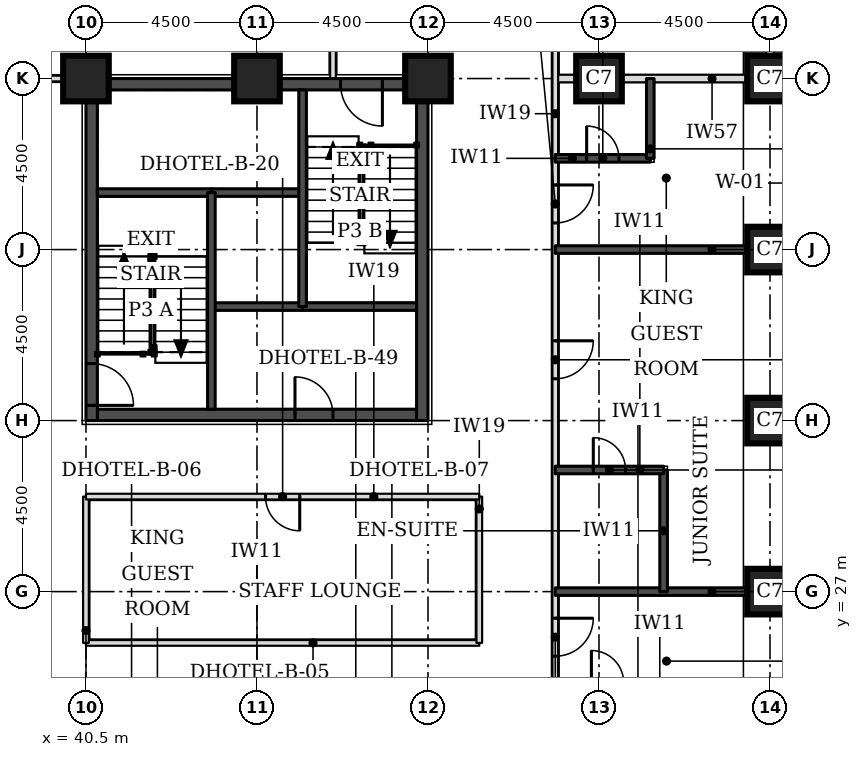
"""IFC4 building model, lengths in metres.
Left out: names, types, materials, properties, quantities, classifications, styles, units other than length and angle.
Written with IfcOpenShell. Run it as: python <this file> out.ifc"""

import sys

from ifc_helpers import new_model, si_unit, direction, frame, frame_2d, origin, origin_2d, place, context, subcontext, project, spatial, rectangle, extrude, element, fill, save


model = new_model("IFC4")
c1 = context("Model", 3, precision=1e-05, world=origin(), true_north=direction((0.0, 1.0)))
c2 = subcontext(c1, "Body", "Model", "MODEL_VIEW")
j1 = project(units=[si_unit("LENGTHUNIT", "METRE"), si_unit("PLANEANGLEUNIT", "RADIAN")], contexts=[c1])
p1 = place(None, origin())
s1 = spatial("IfcSite", under=j1, at=p1, CompositionType="ELEMENT")
p2 = place(p1, origin())
s2 = spatial("IfcBuilding", under=s1, at=p2, CompositionType="ELEMENT")
p3 = place(p2, frame((0.0, 0.0, 29.7)))
s3 = spatial("IfcBuildingStorey", under=s2, at=p3, CompositionType="ELEMENT", Elevation=29.7)
for number, where, z_axis, x_axis in (
    (1, (58.5, 27.0, 0.0), (0.0, 0.0, 1.0), (1.0, 0.0, 0.0)),
    (2, (58.5, 31.5, 0.0), (0.0, 0.0, 1.0), (1.0, 0.0, 0.0)),
    (3, (58.5, 36.0, 0.0), (0.0, 0.0, 1.0), (1.0, 0.0, 0.0)),
    (4, (40.5, 40.5, 0.0), (0.0, 0.0, 1.0), (1.0, 0.0, 0.0)),
    (5, (45.0, 40.5, 0.0), (0.0, 0.0, 1.0), (1.0, 0.0, 0.0)),
    (6, (49.5, 40.5, 0.0), (0.0, 0.0, 1.0), (1.0, 0.0, 0.0)),
    (7, (54.0, 40.5, 0.0), (0.0, 0.0, 1.0), (1.0, 0.0, 0.0)),
    (8, (58.5, 40.5, 0.0), (0.0, 0.0, 1.0), (1.0, 0.0, 0.0)),
):
    element("IfcColumn", number, at=place(p3, frame(where, z_axis=z_axis, x_axis=x_axis)), inside=s3, PredefinedType="COLUMN", context=c2, shape_type="SweptSolid", body=[
        extrude(rectangle(XDim=1.2, YDim=1.2, at=origin_2d()), origin(), (0.0, 0.0, 1.0), 3.3),
    ])
p4 = place(p3, frame((40.8, 31.65, 0.0), z_axis=(0.0, 0.0, 1.0), x_axis=(1.0, 0.0, 0.0)))
e9 = element("IfcWall", 9, at=p4, inside=s3, PredefinedType="SHEAR", context=c2, shape_type="SweptSolid", body=[
    extrude(rectangle(XDim=8.4, YDim=0.3, at=frame_2d((4.2, 0.0))), origin(), (0.0, 0.0, 1.0), 3.3),
])
p5 = place(p4, frame((5.2, 0.0, 0.0)))
e10 = element("IfcOpeningElement", 10, at=p5, cuts=e9, PredefinedType="OPENING", context=c2, shape_type="SweptSolid", body=[
    extrude(rectangle(XDim=1.0, YDim=2.1, at=frame_2d((0.5, 1.05))), frame((0.0, 0.16, 0.0), z_axis=(0.0, -1.0, 0.0), x_axis=(1.0, 0.0, 0.0)), (0.0, 0.0, 1.0), 0.32),
])
p6 = place(p3, frame((40.8, 40.35, 0.0), z_axis=(0.0, 0.0, 1.0), x_axis=(1.0, 0.0, 0.0)))
e11 = element("IfcWall", 11, at=p6, inside=s3, PredefinedType="SHEAR", context=c2, shape_type="SweptSolid", body=[
    extrude(rectangle(XDim=8.4, YDim=0.3, at=frame_2d((4.2, 0.0))), origin(), (0.0, 0.0, 1.0), 3.3),
])
p7 = place(p6, frame((6.4, 0.0, 0.0)))
e12 = element("IfcOpeningElement", 12, at=p7, cuts=e11, PredefinedType="OPENING", context=c2, shape_type="SweptSolid", body=[
    extrude(rectangle(XDim=1.1, YDim=2.1, at=frame_2d((0.55, 1.05))), frame((0.0, 0.16, 0.0), z_axis=(0.0, -1.0, 0.0), x_axis=(1.0, 0.0, 0.0)), (0.0, 0.0, 1.0), 0.32),
])
p8 = place(p3, frame((40.65, 31.5, 0.0), z_axis=(0.0, 0.0, 1.0), x_axis=(0.0, 1.0, 0.0)))
e13 = element("IfcWall", 13, at=p8, inside=s3, PredefinedType="SHEAR", context=c2, shape_type="SweptSolid", body=[
    extrude(rectangle(XDim=9.0, YDim=0.3, at=frame_2d((4.5, 0.0))), origin(), (0.0, 0.0, 1.0), 3.3),
])
p9 = place(p8, frame((0.4, 0.0, 0.0)))
e14 = element("IfcOpeningElement", 14, at=p9, cuts=e13, PredefinedType="OPENING", context=c2, shape_type="SweptSolid", body=[
    extrude(rectangle(XDim=1.1, YDim=2.1, at=frame_2d((0.55, 1.05))), frame((0.0, 0.16, 0.0), z_axis=(0.0, -1.0, 0.0), x_axis=(1.0, 0.0, 0.0)), (0.0, 0.0, 1.0), 0.32),
])
p10 = place(p3, frame((49.35, 31.5, 0.0), z_axis=(0.0, 0.0, 1.0), x_axis=(0.0, 1.0, 0.0)))
e15 = element("IfcWall", 15, at=p10, inside=s3, PredefinedType="SHEAR", context=c2, shape_type="SweptSolid", body=[
    extrude(rectangle(XDim=9.0, YDim=0.3, at=frame_2d((4.5, 0.0))), origin(), (0.0, 0.0, 1.0), 3.3),
])
p11 = place(p3, frame((52.85, 40.5, 0.0), z_axis=(0.0, 0.0, 1.0), x_axis=(1.0, 0.0, 0.0)))
e16 = element("IfcWall", 16, at=p11, inside=s3, PredefinedType="PARTITIONING", context=c2, shape_type="SweptSolid", body=[
    extrude(rectangle(XDim=5.05, YDim=0.2, at=frame_2d((2.525, 0.0))), origin(), (0.0, 0.0, 1.0), 2.33),
])
p12 = place(p3, frame((58.5, 41.1, 0.0), z_axis=(0.0, 0.0, 1.0), x_axis=(0.0, 1.0, 0.0)))
e17 = element("IfcWall", 17, at=p12, inside=s3, PredefinedType="PARTITIONING", context=c2, shape_type="SweptSolid", body=[
    extrude(rectangle(XDim=6.4, YDim=0.2, at=frame_2d((3.2, 0.0))), origin(), (0.0, 0.0, 1.0), 3.08),
])
p13 = place(p3, frame((52.85, 23.65, 0.0), z_axis=(0.0, 0.0, 1.0), x_axis=(0.0, 1.0, 0.0)))
e18 = element("IfcWall", 18, at=p13, inside=s3, PredefinedType="PARTITIONING", context=c2, shape_type="SweptSolid", body=[
    extrude(rectangle(XDim=23.85, YDim=0.15, at=frame_2d((11.925, 0.0))), origin(), (0.0, 0.0, 1.0), 3.08),
])
p14 = place(p13, frame((1.65, 0.0, 0.0)))
e19 = element("IfcOpeningElement", 19, at=p14, cuts=e18, PredefinedType="OPENING", context=c2, shape_type="SweptSolid", body=[
    extrude(rectangle(XDim=1.0, YDim=2.1, at=frame_2d((0.5, 1.05))), frame((0.0, 0.085, 0.0), z_axis=(0.0, -1.0, 0.0), x_axis=(1.0, 0.0, 0.0)), (0.0, 0.0, 1.0), 0.17),
])
p15 = place(p13, frame((8.95, 0.0, 0.0)))
e20 = element("IfcOpeningElement", 20, at=p15, cuts=e18, PredefinedType="OPENING", context=c2, shape_type="SweptSolid", body=[
    extrude(rectangle(XDim=1.0, YDim=2.1, at=frame_2d((0.5, 1.05))), frame((0.0, 0.085, 0.0), z_axis=(0.0, -1.0, 0.0), x_axis=(1.0, 0.0, 0.0)), (0.0, 0.0, 1.0), 0.17),
])
p16 = place(p13, frame((13.05, 0.0, 0.0)))
e21 = element("IfcOpeningElement", 21, at=p16, cuts=e18, PredefinedType="OPENING", context=c2, shape_type="SweptSolid", body=[
    extrude(rectangle(XDim=1.0, YDim=2.1, at=frame_2d((0.5, 1.05))), frame((0.0, 0.085, 0.0), z_axis=(0.0, -1.0, 0.0), x_axis=(1.0, 0.0, 0.0)), (0.0, 0.0, 1.0), 0.17),
])
p17 = place(p13, frame((19.9, 0.0, 0.0)))
e22 = element("IfcOpeningElement", 22, at=p17, cuts=e18, PredefinedType="OPENING", context=c2, shape_type="SweptSolid", body=[
    extrude(rectangle(XDim=0.9, YDim=2.1, at=frame_2d((0.45, 1.05))), frame((0.0, 0.085, 0.0), z_axis=(0.0, -1.0, 0.0), x_axis=(1.0, 0.0, 0.0)), (0.0, 0.0, 1.0), 0.17),
])
p18 = place(p3, frame((40.5, 25.65, 0.0), z_axis=(0.0, 0.0, 1.0), x_axis=(1.0, 0.0, 0.0)))
e23 = element("IfcWall", 23, at=p18, inside=s3, PredefinedType="PARTITIONING", context=c2, shape_type="SweptSolid", body=[
    extrude(rectangle(XDim=10.35, YDim=0.15, at=frame_2d((5.175, 0.0))), origin(), (0.0, 0.0, 1.0), 3.08),
])
for number, where, z_axis, x_axis in (
    (24, (40.5, 25.65, 0.0), (0.0, 0.0, 1.0), (0.0, 1.0, 0.0)),
    (25, (50.85, 25.65, 0.0), (0.0, 0.0, 1.0), (0.0, 1.0, 0.0)),
):
    element("IfcWall", number, at=place(p3, frame(where, z_axis=z_axis, x_axis=x_axis)), inside=s3, PredefinedType="PARTITIONING", context=c2, shape_type="SweptSolid", body=[
        extrude(rectangle(XDim=3.85, YDim=0.15, at=frame_2d((1.925, 0.0))), origin(), (0.0, 0.0, 1.0), 3.08),
    ])
p19 = place(p3, frame((40.5, 29.5, 0.0), z_axis=(0.0, 0.0, 1.0), x_axis=(1.0, 0.0, 0.0)))
e26 = element("IfcWall", 26, at=p19, inside=s3, PredefinedType="PARTITIONING", context=c2, shape_type="SweptSolid", body=[
    extrude(rectangle(XDim=10.35, YDim=0.15, at=frame_2d((5.175, 0.0))), origin(), (0.0, 0.0, 1.0), 3.08),
])
p20 = place(p19, frame((4.725, 0.0, 0.0)))
e27 = element("IfcOpeningElement", 27, at=p20, cuts=e26, PredefinedType="OPENING", context=c2, shape_type="SweptSolid", body=[
    extrude(rectangle(XDim=0.9, YDim=2.1, at=frame_2d((0.45, 1.05))), frame((0.0, 0.085, 0.0), z_axis=(0.0, -1.0, 0.0), x_axis=(1.0, 0.0, 0.0)), (0.0, 0.0, 1.0), 0.17),
])
p21 = place(p3, frame((38.5, 40.5, 0.0), z_axis=(0.0, 0.0, 1.0), x_axis=(1.0, 0.0, 0.0)))
e28 = element("IfcWall", 28, at=p21, inside=s3, PredefinedType="PARTITIONING", context=c2, shape_type="SweptSolid", body=[
    extrude(rectangle(XDim=1.95, YDim=0.15, at=frame_2d((0.975, 0.0))), origin(), (0.0, 0.0, 1.0), 2.33),
])
p22 = place(p3, frame((47.0, 40.5, 0.0), z_axis=(0.0, 0.0, 1.0), x_axis=(0.0, 1.0, 0.0)))
e29 = element("IfcWall", 29, at=p22, inside=s3, PredefinedType="PARTITIONING", context=c2, shape_type="SweptSolid", body=[
    extrude(rectangle(XDim=7.0, YDim=0.15, at=frame_2d((3.5, 0.0))), origin(), (0.0, 0.0, 1.0), 3.08),
])
p23 = place(p22, frame((3.05, 0.0, 0.0)))
e30 = element("IfcOpeningElement", 30, at=p23, cuts=e29, PredefinedType="OPENING", context=c2, shape_type="SweptSolid", body=[
    extrude(rectangle(XDim=0.9, YDim=2.1, at=frame_2d((0.45, 1.05))), frame((0.0, 0.085, 0.0), z_axis=(0.0, -1.0, 0.0), x_axis=(1.0, 0.0, 0.0)), (0.0, 0.0, 1.0), 0.17),
])
p24 = place(p3, frame((52.85, 27.0, 0.0), z_axis=(0.0, 0.0, 1.0), x_axis=(1.0, 0.0, 0.0)))
e31 = element("IfcWall", 31, at=p24, inside=s3, PredefinedType="SOLIDWALL", context=c2, shape_type="SweptSolid", body=[
    extrude(rectangle(XDim=5.05, YDim=0.2, at=frame_2d((2.525, 0.0))), origin(), (0.0, 0.0, 1.0), 3.08),
])
p25 = place(p3, frame((55.7, 27.0, 0.0), z_axis=(0.0, 0.0, 1.0), x_axis=(0.0, 1.0, 0.0)))
e32 = element("IfcWall", 32, at=p25, inside=s3, PredefinedType="SOLIDWALL", context=c2, shape_type="SweptSolid", body=[
    extrude(rectangle(XDim=3.2, YDim=0.2, at=frame_2d((1.6, 0.0))), origin(), (0.0, 0.0, 1.0), 3.08),
])
p26 = place(p3, frame((52.85, 30.2, 0.0), z_axis=(0.0, 0.0, 1.0), x_axis=(1.0, 0.0, 0.0)))
e33 = element("IfcWall", 33, at=p26, inside=s3, PredefinedType="SOLIDWALL", context=c2, shape_type="SweptSolid", body=[
    extrude(rectangle(XDim=2.85, YDim=0.2, at=frame_2d((1.425, 0.0))), origin(), (0.0, 0.0, 1.0), 3.08),
])
p27 = place(p26, frame((1.0, 0.0, 0.0)))
e34 = element("IfcOpeningElement", 34, at=p27, cuts=e33, PredefinedType="OPENING", context=c2, shape_type="SweptSolid", body=[
    extrude(rectangle(XDim=0.85, YDim=2.1, at=frame_2d((0.425, 1.05))), frame((0.0, 0.11, 0.0), z_axis=(0.0, -1.0, 0.0), x_axis=(1.0, 0.0, 0.0)), (0.0, 0.0, 1.0), 0.22),
])
p28 = place(p3, frame((52.85, 36.0, 0.0), z_axis=(0.0, 0.0, 1.0), x_axis=(1.0, 0.0, 0.0)))
e35 = element("IfcWall", 35, at=p28, inside=s3, PredefinedType="SOLIDWALL", context=c2, shape_type="SweptSolid", body=[
    extrude(rectangle(XDim=5.05, YDim=0.2, at=frame_2d((2.525, 0.0))), origin(), (0.0, 0.0, 1.0), 3.08),
])
p29 = place(p3, frame((52.85, 38.4, 0.0), z_axis=(0.0, 0.0, 1.0), x_axis=(1.0, 0.0, 0.0)))
e36 = element("IfcWall", 36, at=p29, inside=s3, PredefinedType="SOLIDWALL", context=c2, shape_type="SweptSolid", body=[
    extrude(rectangle(XDim=2.5, YDim=0.2, at=frame_2d((1.25, 0.0))), origin(), (0.0, 0.0, 1.0), 3.08),
])
p30 = place(p29, frame((0.825, 0.0, 0.0)))
e37 = element("IfcOpeningElement", 37, at=p30, cuts=e36, PredefinedType="OPENING", context=c2, shape_type="SweptSolid", body=[
    extrude(rectangle(XDim=0.85, YDim=2.1, at=frame_2d((0.425, 1.05))), frame((0.0, 0.11, 0.0), z_axis=(0.0, -1.0, 0.0), x_axis=(1.0, 0.0, 0.0)), (0.0, 0.0, 1.0), 0.22),
])
p31 = place(p3, frame((55.35, 38.4, 0.0), z_axis=(0.0, 0.0, 1.0), x_axis=(0.0, 1.0, 0.0)))
e38 = element("IfcWall", 38, at=p31, inside=s3, PredefinedType="SOLIDWALL", context=c2, shape_type="SweptSolid", body=[
    extrude(rectangle(XDim=2.1, YDim=0.2, at=frame_2d((1.05, 0.0))), origin(), (0.0, 0.0, 1.0), 3.08),
])
p32 = place(p3, frame((43.8, 34.5, 0.0), z_axis=(0.0, 0.0, 1.0), x_axis=(1.0, 0.0, 0.0)))
e39 = element("IfcWall", 39, at=p32, inside=s3, PredefinedType="SOLIDWALL", context=c2, shape_type="SweptSolid", body=[
    extrude(rectangle(XDim=2.4, YDim=0.2, at=frame_2d((1.2, 0.0))), origin(), (0.0, 0.0, 1.0), 3.08),
])
p33 = place(p3, frame((46.2, 34.5, 0.0), z_axis=(0.0, 0.0, 1.0), x_axis=(1.0, 0.0, 0.0)))
e40 = element("IfcWall", 40, at=p33, inside=s3, PredefinedType="SOLIDWALL", context=c2, shape_type="SweptSolid", body=[
    extrude(rectangle(XDim=3.0, YDim=0.2, at=frame_2d((1.5, 0.0))), origin(), (0.0, 0.0, 1.0), 3.08),
])
p34 = place(p3, frame((43.8, 37.5, 0.0), z_axis=(0.0, 0.0, 1.0), x_axis=(1.0, 0.0, 0.0)))
e41 = element("IfcWall", 41, at=p34, inside=s3, PredefinedType="SOLIDWALL", context=c2, shape_type="SweptSolid", body=[
    extrude(rectangle(XDim=2.4, YDim=0.2, at=frame_2d((1.2, 0.0))), origin(), (0.0, 0.0, 1.0), 3.3),
])
p35 = place(p3, frame((40.8, 37.5, 0.0), z_axis=(0.0, 0.0, 1.0), x_axis=(1.0, 0.0, 0.0)))
e42 = element("IfcWall", 42, at=p35, inside=s3, PredefinedType="SOLIDWALL", context=c2, shape_type="SweptSolid", body=[
    extrude(rectangle(XDim=3.0, YDim=0.2, at=frame_2d((1.5, 0.0))), origin(), (0.0, 0.0, 1.0), 3.08),
])
for number, where, z_axis, x_axis in (
    (43, (43.8, 31.8, 0.0), (0.0, 0.0, 1.0), (0.0, 1.0, 0.0)),
    (44, (46.2, 34.5, 0.0), (0.0, 0.0, 1.0), (0.0, 1.0, 0.0)),
):
    element("IfcWall", number, at=place(p3, frame(where, z_axis=z_axis, x_axis=x_axis)), inside=s3, PredefinedType="SOLIDWALL", context=c2, shape_type="SweptSolid", body=[
        extrude(rectangle(XDim=5.7, YDim=0.2, at=frame_2d((2.85, 0.0))), origin(), (0.0, 0.0, 1.0), 3.08),
    ])
p36 = place(p14, frame((1.0, 0.0, 0.0), z_axis=(0.0, 0.0, 1.0), x_axis=(-1.0, 0.0, 0.0)))
e45 = element("IfcDoor", 45, at=p36, inside=s3, OperationType="SINGLE_SWING_LEFT", PredefinedType="DOOR", context=c2, shape_type="SweptSolid", body=[
    extrude(rectangle(XDim=1.0, YDim=2.1, at=frame_2d((0.5, 1.05))), frame((0.0, 0.025, 0.0), z_axis=(0.0, -1.0, 0.0), x_axis=(1.0, 0.0, 0.0)), (0.0, 0.0, 1.0), 0.05),
])
fill(e19, e45)
p37 = place(p15, frame((1.0, 0.0, 0.0), z_axis=(0.0, 0.0, 1.0), x_axis=(-1.0, 0.0, 0.0)))
e46 = element("IfcDoor", 46, at=p37, inside=s3, OperationType="SINGLE_SWING_LEFT", PredefinedType="DOOR", context=c2, shape_type="SweptSolid", body=[
    extrude(rectangle(XDim=1.0, YDim=2.1, at=frame_2d((0.5, 1.05))), frame((0.0, 0.025, 0.0), z_axis=(0.0, -1.0, 0.0), x_axis=(1.0, 0.0, 0.0)), (0.0, 0.0, 1.0), 0.05),
])
fill(e20, e46)
p38 = place(p27, origin())
e47 = element("IfcDoor", 47, at=p38, inside=s3, OperationType="SINGLE_SWING_LEFT", PredefinedType="DOOR", context=c2, shape_type="SweptSolid", body=[
    extrude(rectangle(XDim=0.85, YDim=2.1, at=frame_2d((0.425, 1.05))), frame((0.0, 0.025, 0.0), z_axis=(0.0, -1.0, 0.0), x_axis=(1.0, 0.0, 0.0)), (0.0, 0.0, 1.0), 0.05),
])
fill(e34, e47)
p39 = place(p16, frame((1.0, 0.0, 0.0), z_axis=(0.0, 0.0, 1.0), x_axis=(-1.0, 0.0, 0.0)))
e48 = element("IfcDoor", 48, at=p39, inside=s3, OperationType="SINGLE_SWING_LEFT", PredefinedType="DOOR", context=c2, shape_type="SweptSolid", body=[
    extrude(rectangle(XDim=1.0, YDim=2.1, at=frame_2d((0.5, 1.05))), frame((0.0, 0.025, 0.0), z_axis=(0.0, -1.0, 0.0), x_axis=(1.0, 0.0, 0.0)), (0.0, 0.0, 1.0), 0.05),
])
fill(e21, e48)
p40 = place(p30, origin())
e49 = element("IfcDoor", 49, at=p40, inside=s3, OperationType="SINGLE_SWING_LEFT", PredefinedType="DOOR", context=c2, shape_type="SweptSolid", body=[
    extrude(rectangle(XDim=0.85, YDim=2.1, at=frame_2d((0.425, 1.05))), frame((0.0, 0.025, 0.0), z_axis=(0.0, -1.0, 0.0), x_axis=(1.0, 0.0, 0.0)), (0.0, 0.0, 1.0), 0.05),
])
fill(e37, e49)
p41 = place(p20, frame((0.9, 0.0, 0.0), z_axis=(0.0, 0.0, 1.0), x_axis=(-1.0, 0.0, 0.0)))
e50 = element("IfcDoor", 50, at=p41, inside=s3, OperationType="SINGLE_SWING_LEFT", PredefinedType="DOOR", context=c2, shape_type="SweptSolid", body=[
    extrude(rectangle(XDim=0.9, YDim=2.1, at=frame_2d((0.45, 1.05))), frame((0.0, 0.025, 0.0), z_axis=(0.0, -1.0, 0.0), x_axis=(1.0, 0.0, 0.0)), (0.0, 0.0, 1.0), 0.05),
])
fill(e27, e50)
p42 = place(p9, frame((1.1, 0.0, 0.0), z_axis=(0.0, 0.0, 1.0), x_axis=(-1.0, 0.0, 0.0)))
e51 = element("IfcDoor", 51, at=p42, inside=s3, OperationType="SINGLE_SWING_RIGHT", PredefinedType="DOOR", context=c2, shape_type="SweptSolid", body=[
    extrude(rectangle(XDim=1.1, YDim=2.1, at=frame_2d((0.55, 1.05))), frame((0.0, 0.025, 0.0), z_axis=(0.0, -1.0, 0.0), x_axis=(1.0, 0.0, 0.0)), (0.0, 0.0, 1.0), 0.05),
])
fill(e14, e51)
p43 = place(p7, frame((1.1, 0.0, 0.0), z_axis=(0.0, 0.0, 1.0), x_axis=(-1.0, 0.0, 0.0)))
e52 = element("IfcDoor", 52, at=p43, inside=s3, OperationType="SINGLE_SWING_LEFT", PredefinedType="DOOR", context=c2, shape_type="SweptSolid", body=[
    extrude(rectangle(XDim=1.1, YDim=2.1, at=frame_2d((0.55, 1.05))), frame((0.0, 0.025, 0.0), z_axis=(0.0, -1.0, 0.0), x_axis=(1.0, 0.0, 0.0)), (0.0, 0.0, 1.0), 0.05),
])
fill(e12, e52)
p44 = place(p5, origin())
e53 = element("IfcDoor", 53, at=p44, inside=s3, OperationType="SINGLE_SWING_LEFT", PredefinedType="DOOR", context=c2, shape_type="SweptSolid", body=[
    extrude(rectangle(XDim=1.0, YDim=2.1, at=frame_2d((0.5, 1.05))), frame((0.0, 0.025, 0.0), z_axis=(0.0, -1.0, 0.0), x_axis=(1.0, 0.0, 0.0)), (0.0, 0.0, 1.0), 0.05),
])
fill(e10, e53)
save(model, sys.argv[1])
